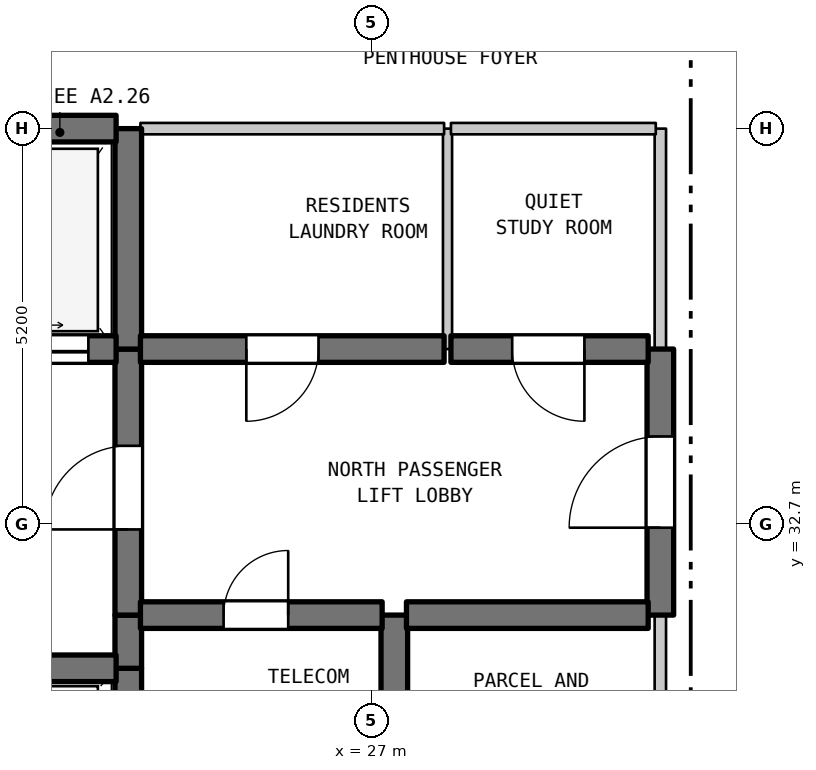
"""IFC4 building model, lengths in metres.
Left out: names, types, materials, properties, quantities, classifications, styles, units other than length and angle.
Written with IfcOpenShell. Run it as: python <this file> out.ifc"""

import sys

from ifc_helpers import new_model, si_unit, direction, frame, frame_2d, origin, place, context, subcontext, project, spatial, rectangle, extrude, element, fill, save


model = new_model("IFC4")
c1 = context("Model", 3, precision=1e-05, world=origin(), true_north=direction((0.0, 1.0)))
c2 = subcontext(c1, "Body", "Model", "MODEL_VIEW")
j1 = project(units=[si_unit("LENGTHUNIT", "METRE"), si_unit("PLANEANGLEUNIT", "RADIAN")], contexts=[c1])
p1 = place(None, origin())
s1 = spatial("IfcSite", under=j1, at=p1, CompositionType="ELEMENT")
p2 = place(p1, origin())
s2 = spatial("IfcBuilding", under=s1, at=p2, CompositionType="ELEMENT")
p3 = place(p2, frame((0.0, 0.0, 265.8)))
s3 = spatial("IfcBuildingStorey", under=s2, at=p3, CompositionType="ELEMENT", Elevation=265.8)
p4 = place(p3, frame((23.8, 28.2, 0.0), z_axis=(0.0, 0.0, 1.0), x_axis=(0.0, 1.0, 0.0)))
e1 = element("IfcWall", 1, at=p4, inside=s3, PredefinedType="SHEAR", context=c2, shape_type="SweptSolid", body=[
    extrude(rectangle(XDim=2.6, YDim=0.35, at=frame_2d((1.3, 0.0))), origin(), (0.0, 0.0, 1.0), 3.39),
])
p5 = place(p3, frame((23.8, 30.8, 0.0), z_axis=(0.0, 0.0, 1.0), x_axis=(0.0, 1.0, 0.0)))
e2 = element("IfcWall", 2, at=p5, inside=s3, PredefinedType="SHEAR", context=c2, shape_type="SweptSolid", body=[
    extrude(rectangle(XDim=0.7, YDim=0.35, at=frame_2d((0.35, 0.0))), origin(), (0.0, 0.0, 1.0), 3.39),
])
p6 = place(p3, frame((23.8, 31.5, 0.0), z_axis=(0.0, 0.0, 1.0), x_axis=(0.0, 1.0, 0.0)))
e3 = element("IfcWall", 3, at=p6, inside=s3, PredefinedType="SHEAR", context=c2, shape_type="SweptSolid", body=[
    extrude(rectangle(XDim=3.5, YDim=0.35, at=frame_2d((1.75, 0.0))), origin(), (0.0, 0.0, 1.0), 3.39),
])
p7 = place(p6, frame((1.127, 0.0, 0.0)))
e4 = element("IfcOpeningElement", 4, at=p7, cuts=e3, PredefinedType="OPENING", context=c2, shape_type="SweptSolid", body=[
    extrude(rectangle(XDim=1.1, YDim=2.15, at=frame_2d((0.55, 1.075))), frame((0.0, 0.185, 0.0), z_axis=(0.0, -1.0, 0.0), x_axis=(1.0, 0.0, 0.0)), (0.0, 0.0, 1.0), 0.37),
])
p8 = place(p3, frame((23.8, 35.0, 0.0), z_axis=(0.0, 0.0, 1.0), x_axis=(0.0, 1.0, 0.0)))
e5 = element("IfcWall", 5, at=p8, inside=s3, PredefinedType="SHEAR", context=c2, shape_type="SweptSolid", body=[
    extrude(rectangle(XDim=2.9, YDim=0.35, at=frame_2d((1.45, 0.0))), origin(), (0.0, 0.0, 1.0), 3.39),
])
p9 = place(p3, frame((27.3, 28.9, 0.0), z_axis=(0.0, 0.0, 1.0), x_axis=(0.0, 1.0, 0.0)))
e6 = element("IfcWall", 6, at=p9, inside=s3, PredefinedType="SHEAR", context=c2, shape_type="SweptSolid", body=[
    extrude(rectangle(XDim=2.6, YDim=0.35, at=frame_2d((1.3, 0.0))), origin(), (0.0, 0.0, 1.0), 3.39),
])
p10 = place(p3, frame((28.0, 35.0, 0.0), z_axis=(0.0, 0.0, 1.0), x_axis=(0.0, 1.0, 0.0)))
e7 = element("IfcWall", 7, at=p10, inside=s3, PredefinedType="PARTITIONING", context=c2, shape_type="SweptSolid", body=[
    extrude(rectangle(XDim=2.9, YDim=0.12, at=frame_2d((1.45, 0.0))), origin(), (0.0, 0.0, 1.0), 3.39),
])
p11 = place(p3, frame((30.8, 28.9, 0.0), z_axis=(0.0, 0.0, 1.0), x_axis=(0.0, 1.0, 0.0)))
e8 = element("IfcWall", 8, at=p11, inside=s3, PredefinedType="STANDARD", context=c2, shape_type="SweptSolid", body=[
    extrude(rectangle(XDim=2.6, YDim=0.15, at=frame_2d((1.3, 0.0))), origin(), (0.0, 0.0, 1.0), 3.39),
])
p12 = place(p3, frame((30.8, 31.5, 0.0), z_axis=(0.0, 0.0, 1.0), x_axis=(0.0, 1.0, 0.0)))
e9 = element("IfcWall", 9, at=p12, inside=s3, PredefinedType="SHEAR", context=c2, shape_type="SweptSolid", body=[
    extrude(rectangle(XDim=3.5, YDim=0.35, at=frame_2d((1.75, 0.0))), origin(), (0.0, 0.0, 1.0), 3.39),
])
p13 = place(p12, frame((1.15, 0.0, 0.0)))
e10 = element("IfcOpeningElement", 10, at=p13, cuts=e9, PredefinedType="OPENING", context=c2, shape_type="SweptSolid", body=[
    extrude(rectangle(XDim=1.2, YDim=2.2, at=frame_2d((0.6, 1.1))), frame((0.0, 0.185, 0.0), z_axis=(0.0, -1.0, 0.0), x_axis=(1.0, 0.0, 0.0)), (0.0, 0.0, 1.0), 0.37),
])
p14 = place(p3, frame((30.8, 35.0, 0.0), z_axis=(0.0, 0.0, 1.0), x_axis=(0.0, 1.0, 0.0)))
e11 = element("IfcWall", 11, at=p14, inside=s3, PredefinedType="STANDARD", context=c2, shape_type="SweptSolid", body=[
    extrude(rectangle(XDim=2.9, YDim=0.15, at=frame_2d((1.45, 0.0))), origin(), (0.0, 0.0, 1.0), 3.39),
])
p15 = place(p3, frame((19.16, 30.8, 0.0), z_axis=(0.0, 0.0, 1.0), x_axis=(1.0, 0.0, 0.0)))
e12 = element("IfcWall", 12, at=p15, inside=s3, PredefinedType="SHEAR", context=c2, shape_type="SweptSolid", body=[
    extrude(rectangle(XDim=4.48, YDim=0.35, at=frame_2d((2.24, 0.0))), origin(), (0.0, 0.0, 1.0), 3.39),
])
p16 = place(p3, frame((23.96, 31.5, 0.0), z_axis=(0.0, 0.0, 1.0), x_axis=(1.0, 0.0, 0.0)))
e13 = element("IfcWall", 13, at=p16, inside=s3, PredefinedType="SHEAR", context=c2, shape_type="SweptSolid", body=[
    extrude(rectangle(XDim=3.18, YDim=0.35, at=frame_2d((1.59, 0.0))), origin(), (0.0, 0.0, 1.0), 3.39),
])
p17 = place(p16, frame((1.094, 0.0, 0.0)))
e14 = element("IfcOpeningElement", 14, at=p17, cuts=e13, PredefinedType="OPENING", context=c2, shape_type="SweptSolid", body=[
    extrude(rectangle(XDim=0.85, YDim=2.1, at=frame_2d((0.425, 1.05))), frame((0.0, 0.185, 0.0), z_axis=(0.0, -1.0, 0.0), x_axis=(1.0, 0.0, 0.0)), (0.0, 0.0, 1.0), 0.37),
])
p18 = place(p3, frame((27.46, 31.5, 0.0), z_axis=(0.0, 0.0, 1.0), x_axis=(1.0, 0.0, 0.0)))
e15 = element("IfcWall", 15, at=p18, inside=s3, PredefinedType="SHEAR", context=c2, shape_type="SweptSolid", body=[
    extrude(rectangle(XDim=3.18, YDim=0.35, at=frame_2d((1.59, 0.0))), origin(), (0.0, 0.0, 1.0), 3.39),
])
p19 = place(p3, frame((19.16, 35.0, 0.0), z_axis=(0.0, 0.0, 1.0), x_axis=(1.0, 0.0, 0.0)))
e16 = element("IfcWall", 16, at=p19, inside=s3, PredefinedType="SHEAR", context=c2, shape_type="SweptSolid", body=[
    extrude(rectangle(XDim=4.48, YDim=0.35, at=frame_2d((2.24, 0.0))), origin(), (0.0, 0.0, 1.0), 3.39),
])
p20 = place(p19, frame((0.365, 0.0, 0.0)))
e17 = element("IfcOpeningElement", 17, at=p20, cuts=e16, PredefinedType="OPENING", context=c2, shape_type="SweptSolid", body=[
    extrude(rectangle(XDim=1.35, YDim=2.2, at=frame_2d((0.675, 1.1))), frame((0.0, 0.185, 0.0), z_axis=(0.0, -1.0, 0.0), x_axis=(1.0, 0.0, 0.0)), (0.0, 0.0, 1.0), 0.37),
])
p21 = place(p19, frame((2.765, 0.0, 0.0)))
e18 = element("IfcOpeningElement", 18, at=p21, cuts=e16, PredefinedType="OPENING", context=c2, shape_type="SweptSolid", body=[
    extrude(rectangle(XDim=1.35, YDim=2.2, at=frame_2d((0.675, 1.1))), frame((0.0, 0.185, 0.0), z_axis=(0.0, -1.0, 0.0), x_axis=(1.0, 0.0, 0.0)), (0.0, 0.0, 1.0), 0.37),
])
p22 = place(p3, frame((23.96, 35.0, 0.0), z_axis=(0.0, 0.0, 1.0), x_axis=(1.0, 0.0, 0.0)))
e19 = element("IfcWall", 19, at=p22, inside=s3, PredefinedType="SHEAR", context=c2, shape_type="SweptSolid", body=[
    extrude(rectangle(XDim=3.995, YDim=0.35, at=frame_2d((1.998, 0.0))), origin(), (0.0, 0.0, 1.0), 3.39),
])
p23 = place(p22, frame((1.393, 0.0, 0.0)))
e20 = element("IfcOpeningElement", 20, at=p23, cuts=e19, PredefinedType="OPENING", context=c2, shape_type="SweptSolid", body=[
    extrude(rectangle(XDim=0.95, YDim=2.15, at=frame_2d((0.475, 1.075))), frame((0.0, 0.185, 0.0), z_axis=(0.0, -1.0, 0.0), x_axis=(1.0, 0.0, 0.0)), (0.0, 0.0, 1.0), 0.37),
])
p24 = place(p3, frame((28.045, 35.0, 0.0), z_axis=(0.0, 0.0, 1.0), x_axis=(1.0, 0.0, 0.0)))
e21 = element("IfcWall", 21, at=p24, inside=s3, PredefinedType="SHEAR", context=c2, shape_type="SweptSolid", body=[
    extrude(rectangle(XDim=2.595, YDim=0.35, at=frame_2d((1.297, 0.0))), origin(), (0.0, 0.0, 1.0), 3.39),
])
p25 = place(p24, frame((0.806, 0.0, 0.0)))
e22 = element("IfcOpeningElement", 22, at=p25, cuts=e21, PredefinedType="OPENING", context=c2, shape_type="SweptSolid", body=[
    extrude(rectangle(XDim=0.95, YDim=2.15, at=frame_2d((0.475, 1.075))), frame((0.0, 0.185, 0.0), z_axis=(0.0, -1.0, 0.0), x_axis=(1.0, 0.0, 0.0)), (0.0, 0.0, 1.0), 0.37),
])
p26 = place(p3, frame((19.16, 37.9, 0.0), z_axis=(0.0, 0.0, 1.0), x_axis=(1.0, 0.0, 0.0)))
e23 = element("IfcWall", 23, at=p26, inside=s3, PredefinedType="SHEAR", context=c2, shape_type="SweptSolid", body=[
    extrude(rectangle(XDim=4.48, YDim=0.35, at=frame_2d((2.24, 0.0))), origin(), (0.0, 0.0, 1.0), 3.39),
])
p27 = place(p3, frame((23.96, 37.9, 0.0), z_axis=(0.0, 0.0, 1.0), x_axis=(1.0, 0.0, 0.0)))
e24 = element("IfcWall", 24, at=p27, inside=s3, PredefinedType="STANDARD", context=c2, shape_type="SweptSolid", body=[
    extrude(rectangle(XDim=3.995, YDim=0.15, at=frame_2d((1.998, 0.0))), origin(), (0.0, 0.0, 1.0), 2.89),
])
p28 = place(p3, frame((28.045, 37.9, 0.0), z_axis=(0.0, 0.0, 1.0), x_axis=(1.0, 0.0, 0.0)))
e25 = element("IfcWall", 25, at=p28, inside=s3, PredefinedType="STANDARD", context=c2, shape_type="SweptSolid", body=[
    extrude(rectangle(XDim=2.695, YDim=0.15, at=frame_2d((1.348, 0.0))), origin(), (0.0, 0.0, 1.0), 2.89),
])
p29 = place(p7, origin())
e26 = element("IfcDoor", 26, at=p29, inside=s3, OperationType="SINGLE_SWING_LEFT", PredefinedType="DOOR", context=c2, shape_type="SweptSolid", body=[
    extrude(rectangle(XDim=1.1, YDim=2.15, at=frame_2d((0.55, 1.075))), frame((0.0, 0.025, 0.0), z_axis=(0.0, -1.0, 0.0), x_axis=(1.0, 0.0, 0.0)), (0.0, 0.0, 1.0), 0.05),
])
fill(e4, e26)
p30 = place(p13, origin())
e27 = element("IfcDoor", 27, at=p30, inside=s3, OperationType="SINGLE_SWING_LEFT", PredefinedType="DOOR", context=c2, shape_type="SweptSolid", body=[
    extrude(rectangle(XDim=1.2, YDim=2.2, at=frame_2d((0.6, 1.1))), frame((0.0, 0.025, 0.0), z_axis=(0.0, -1.0, 0.0), x_axis=(1.0, 0.0, 0.0)), (0.0, 0.0, 1.0), 0.05),
])
fill(e10, e27)
p31 = place(p17, origin())
e28 = element("IfcDoor", 28, at=p31, inside=s3, OperationType="SINGLE_SWING_RIGHT", PredefinedType="DOOR", context=c2, shape_type="SweptSolid", body=[
    extrude(rectangle(XDim=0.85, YDim=2.1, at=frame_2d((0.425, 1.05))), frame((0.0, 0.025, 0.0), z_axis=(0.0, -1.0, 0.0), x_axis=(1.0, 0.0, 0.0)), (0.0, 0.0, 1.0), 0.05),
])
fill(e14, e28)
p32 = place(p21, origin())
e29 = element("IfcDoor", 29, at=p32, inside=s3, OperationType="DOUBLE_DOOR_SLIDING", PredefinedType="DOOR", context=c2, shape_type="SweptSolid", body=[
    extrude(rectangle(XDim=1.35, YDim=2.2, at=frame_2d((0.675, 1.1))), frame((0.0, 0.025, 0.0), z_axis=(0.0, -1.0, 0.0), x_axis=(1.0, 0.0, 0.0)), (0.0, 0.0, 1.0), 0.05),
])
fill(e18, e29)
p33 = place(p23, frame((0.95, 0.0, 0.0), z_axis=(0.0, 0.0, 1.0), x_axis=(-1.0, 0.0, 0.0)))
e30 = element("IfcDoor", 30, at=p33, inside=s3, OperationType="SINGLE_SWING_LEFT", PredefinedType="DOOR", context=c2, shape_type="SweptSolid", body=[
    extrude(rectangle(XDim=0.95, YDim=2.15, at=frame_2d((0.475, 1.075))), frame((0.0, 0.025, 0.0), z_axis=(0.0, -1.0, 0.0), x_axis=(1.0, 0.0, 0.0)), (0.0, 0.0, 1.0), 0.05),
])
fill(e20, e30)
p34 = place(p25, frame((0.95, 0.0, 0.0), z_axis=(0.0, 0.0, 1.0), x_axis=(-1.0, 0.0, 0.0)))
e31 = element("IfcDoor", 31, at=p34, inside=s3, OperationType="SINGLE_SWING_RIGHT", PredefinedType="DOOR", context=c2, shape_type="SweptSolid", body=[
    extrude(rectangle(XDim=0.95, YDim=2.15, at=frame_2d((0.475, 1.075))), frame((0.0, 0.025, 0.0), z_axis=(0.0, -1.0, 0.0), x_axis=(1.0, 0.0, 0.0)), (0.0, 0.0, 1.0), 0.05),
])
fill(e22, e31)
save(model, sys.argv[1])
